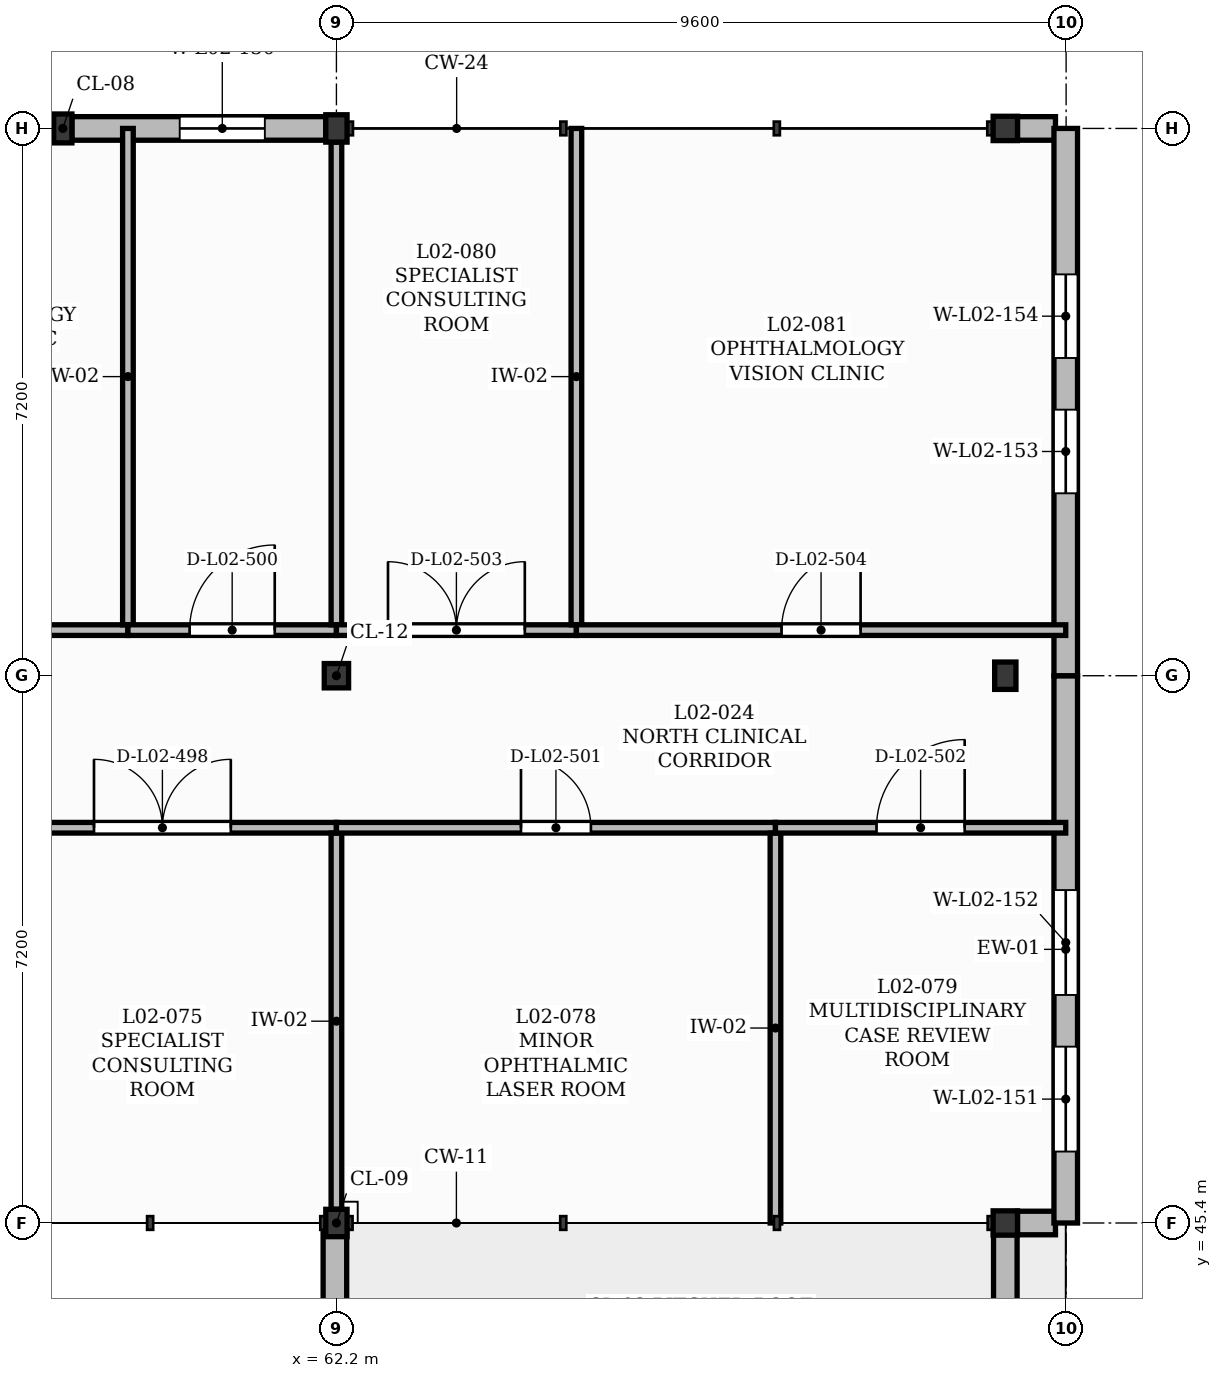
"""IFC4 building model, lengths in metres.
Left out: names, types, materials, properties, quantities, classifications, styles, units other than length and angle.
Written with IfcOpenShell. Run it as: python <this file> out.ifc"""

import sys

from ifc_helpers import new_model, si_unit, direction, frame, frame_2d, origin, origin_2d, place, context, subcontext, project, spatial, polyline, rectangle, outline, extrude, element, fill, save


model = new_model("IFC4")
c1 = context("Model", 3, precision=1e-05, world=origin(), true_north=direction((0.0, 1.0)))
c2 = subcontext(c1, "Body", "Model", "MODEL_VIEW")
j1 = project(units=[si_unit("LENGTHUNIT", "METRE"), si_unit("PLANEANGLEUNIT", "RADIAN")], contexts=[c1])
p1 = place(None, origin())
s1 = spatial("IfcSite", under=j1, at=p1, CompositionType="ELEMENT")
p2 = place(p1, origin())
s2 = spatial("IfcBuilding", under=s1, at=p2, CompositionType="ELEMENT")
p3 = place(p2, frame((0.0, 0.0, 9.0)))
s3 = spatial("IfcBuildingStorey", under=s2, at=p3, CompositionType="ELEMENT", Elevation=9.0)
p4 = place(p3, frame((62.2, 45.4, 0.0), z_axis=(0.0, 0.0, 1.0), x_axis=(1.0, 0.0, 0.0)))
e1 = element("IfcColumn", 1, at=p4, inside=s3, PredefinedType="COLUMN", context=c2, shape_type="SweptSolid", body=[
    extrude(rectangle(XDim=0.28, YDim=0.36, at=origin_2d()), origin(), (0.0, 0.0, 1.0), 3.98),
])
p5 = place(p3, frame((62.2, 52.6, 0.0), z_axis=(0.0, 0.0, 1.0), x_axis=(1.0, 0.0, 0.0)))
e2 = element("IfcColumn", 2, at=p5, inside=s3, PredefinedType="COLUMN", context=c2, shape_type="SweptSolid", body=[
    extrude(rectangle(XDim=0.32, YDim=0.32, at=origin_2d()), origin(), (0.0, 0.0, 1.0), 3.98),
])
p6 = place(p3, frame((62.2, 59.8, 0.0), z_axis=(0.0, 0.0, 1.0), x_axis=(1.0, 0.0, 0.0)))
e3 = element("IfcColumn", 3, at=p6, inside=s3, PredefinedType="COLUMN", context=c2, shape_type="SweptSolid", body=[
    extrude(rectangle(XDim=0.28, YDim=0.36, at=origin_2d()), origin(), (0.0, 0.0, 1.0), 3.98),
])
p7 = place(p3, frame((71.0, 45.4, 0.0), z_axis=(0.0, 0.0, 1.0), x_axis=(1.0, 0.0, 0.0)))
e4 = element("IfcColumn", 4, at=p7, inside=s3, PredefinedType="COLUMN", context=c2, shape_type="SweptSolid", body=[
    extrude(rectangle(XDim=0.32, YDim=0.32, at=origin_2d()), origin(), (0.0, 0.0, 1.0), 3.98),
])
p8 = place(p3, frame((71.0, 52.6, 0.0), z_axis=(0.0, 0.0, 1.0), x_axis=(1.0, 0.0, 0.0)))
e5 = element("IfcColumn", 5, at=p8, inside=s3, PredefinedType="COLUMN", context=c2, shape_type="SweptSolid", body=[
    extrude(rectangle(XDim=0.28, YDim=0.36, at=origin_2d()), origin(), (0.0, 0.0, 1.0), 3.98),
])
p9 = place(p3, frame((71.0, 59.8, 0.0), z_axis=(0.0, 0.0, 1.0), x_axis=(1.0, 0.0, 0.0)))
e6 = element("IfcColumn", 6, at=p9, inside=s3, PredefinedType="COLUMN", context=c2, shape_type="SweptSolid", body=[
    extrude(rectangle(XDim=0.32, YDim=0.32, at=origin_2d()), origin(), (0.0, 0.0, 1.0), 3.98),
])
p10 = place(p3, frame((58.6, 59.8, 0.0), z_axis=(0.0, 0.0, 1.0), x_axis=(1.0, 0.0, 0.0)))
e7 = element("IfcColumn", 7, at=p10, inside=s3, PredefinedType="PILASTER", context=c2, shape_type="SweptSolid", body=[
    extrude(rectangle(XDim=0.24, YDim=0.38, at=origin_2d()), origin(), (0.0, 0.0, 1.0), 3.99),
])
p11 = place(p3, frame((55.16, 59.8, 0.0), z_axis=(0.0, 0.0, 1.0), x_axis=(1.0, 0.0, 0.0)))
e8 = element("IfcWall", 8, at=p11, inside=s3, PredefinedType="SOLIDWALL", context=c2, shape_type="SweptSolid", body=[
    extrude(rectangle(XDim=3.32, YDim=0.31, at=frame_2d((1.66, 0.0))), origin(), (0.0, 0.0, 1.0), 3.52),
])
p12 = place(p11, frame((0.935, 0.0, 1.35)))
e9 = element("IfcOpeningElement", 9, at=p12, cuts=e8, PredefinedType="OPENING", context=c2, shape_type="SweptSolid", body=[
    extrude(rectangle(XDim=1.45, YDim=1.4, at=frame_2d((0.725, 0.7))), frame((0.0, 0.165, 0.0), z_axis=(0.0, -1.0, 0.0), x_axis=(1.0, 0.0, 0.0)), (0.0, 0.0, 1.0), 0.33),
])
p13 = place(p3, frame((58.72, 59.8, 0.0), z_axis=(0.0, 0.0, 1.0), x_axis=(1.0, 0.0, 0.0)))
e10 = element("IfcWall", 10, at=p13, inside=s3, PredefinedType="SOLIDWALL", context=c2, shape_type="SweptSolid", body=[
    extrude(rectangle(XDim=3.34, YDim=0.31, at=frame_2d((1.67, 0.0))), origin(), (0.0, 0.0, 1.0), 3.52),
])
p14 = place(p13, frame((1.418, 0.0, 1.05)))
e11 = element("IfcOpeningElement", 11, at=p14, cuts=e10, PredefinedType="OPENING", context=c2, shape_type="SweptSolid", body=[
    extrude(rectangle(XDim=1.12, YDim=1.65, at=frame_2d((0.56, 0.825))), frame((0.0, 0.165, 0.0), z_axis=(0.0, -1.0, 0.0), x_axis=(1.0, 0.0, 0.0)), (0.0, 0.0, 1.0), 0.33),
])
p15 = place(p3, frame((71.16, 45.4, 0.0), z_axis=(0.0, 0.0, 1.0), x_axis=(1.0, 0.0, 0.0)))
e12 = element("IfcWall", 12, at=p15, inside=s3, PredefinedType="SOLIDWALL", context=c2, shape_type="SweptSolid", body=[
    extrude(rectangle(XDim=0.5, YDim=0.31, at=frame_2d((0.25, 0.0))), origin(), (0.0, 0.0, 1.0), 3.98),
])
p16 = place(p3, frame((71.795, 45.4, 0.0), z_axis=(0.0, 0.0, 1.0), x_axis=(0.0, 1.0, 0.0)))
e13 = element("IfcWall", 13, at=p16, inside=s3, PredefinedType="SOLIDWALL", context=c2, shape_type="SweptSolid", body=[
    extrude(rectangle(XDim=7.2, YDim=0.31, at=frame_2d((3.6, 0.0))), origin(), (0.0, 0.0, 1.0), 3.98),
])
p17 = place(p16, frame((0.94, 0.0, 1.0)))
e14 = element("IfcOpeningElement", 14, at=p17, cuts=e13, PredefinedType="OPENING", context=c2, shape_type="SweptSolid", body=[
    extrude(rectangle(XDim=1.38, YDim=1.8, at=frame_2d((0.69, 0.9))), frame((0.0, 0.165, 0.0), z_axis=(0.0, -1.0, 0.0), x_axis=(1.0, 0.0, 0.0)), (0.0, 0.0, 1.0), 0.33),
])
p18 = place(p16, frame((3.0, 0.0, 1.0)))
e15 = element("IfcOpeningElement", 15, at=p18, cuts=e13, PredefinedType="OPENING", context=c2, shape_type="SweptSolid", body=[
    extrude(rectangle(XDim=1.38, YDim=1.8, at=frame_2d((0.69, 0.9))), frame((0.0, 0.165, 0.0), z_axis=(0.0, -1.0, 0.0), x_axis=(1.0, 0.0, 0.0)), (0.0, 0.0, 1.0), 0.33),
])
p19 = place(p3, frame((71.16, 59.8, 0.0), z_axis=(0.0, 0.0, 1.0), x_axis=(1.0, 0.0, 0.0)))
e16 = element("IfcWall", 16, at=p19, inside=s3, PredefinedType="SOLIDWALL", context=c2, shape_type="SweptSolid", body=[
    extrude(rectangle(XDim=0.5, YDim=0.31, at=frame_2d((0.25, 0.0))), origin(), (0.0, 0.0, 1.0), 3.98),
])
p20 = place(p3, frame((71.795, 52.6, 0.0), z_axis=(0.0, 0.0, 1.0), x_axis=(0.0, 1.0, 0.0)))
e17 = element("IfcWall", 17, at=p20, inside=s3, PredefinedType="SOLIDWALL", context=c2, shape_type="SweptSolid", body=[
    extrude(rectangle(XDim=7.2, YDim=0.31, at=frame_2d((3.6, 0.0))), origin(), (0.0, 0.0, 1.0), 3.98),
])
p21 = place(p20, frame((2.4, 0.0, 1.0)))
e18 = element("IfcOpeningElement", 18, at=p21, cuts=e17, PredefinedType="OPENING", context=c2, shape_type="SweptSolid", body=[
    extrude(rectangle(XDim=1.1, YDim=2.2, at=frame_2d((0.55, 1.1))), frame((0.0, 0.165, 0.0), z_axis=(0.0, -1.0, 0.0), x_axis=(1.0, 0.0, 0.0)), (0.0, 0.0, 1.0), 0.33),
])
p22 = place(p20, frame((4.18, 0.0, 1.0)))
e19 = element("IfcOpeningElement", 19, at=p22, cuts=e17, PredefinedType="OPENING", context=c2, shape_type="SweptSolid", body=[
    extrude(rectangle(XDim=1.1, YDim=2.2, at=frame_2d((0.55, 1.1))), frame((0.0, 0.165, 0.0), z_axis=(0.0, -1.0, 0.0), x_axis=(1.0, 0.0, 0.0)), (0.0, 0.0, 1.0), 0.33),
])
for number, where, z_axis, x_axis in (
    (20, (62.18, 36.8, 0.0), (0.0, 0.0, 1.0), (0.0, 1.0, 0.0)),
    (21, (71.0, 36.8, 0.0), (0.0, 0.0, 1.0), (0.0, 1.0, 0.0)),
):
    element("IfcWall", number, at=place(p3, frame(where, z_axis=z_axis, x_axis=x_axis)), inside=s3, PredefinedType="SOLIDWALL", context=c2, shape_type="SweptSolid", body=[
        extrude(outline(polyline([(0.0, 0.0), (8.6, 0.0), (8.6, 0.05), (4.3, 2.16), (0.0, 0.05), (0.0, 0.0)])), frame((0.0, 0.155, 0.0), z_axis=(0.0, -1.0, 0.0), x_axis=(1.0, 0.0, 0.0)), (0.0, 0.0, 1.0), 0.31),
    ])
p23 = place(p3, frame((55.0, 53.2, 0.0), z_axis=(0.0, 0.0, 1.0), x_axis=(1.0, 0.0, 0.0)))
e22 = element("IfcWall", 22, at=p23, inside=s3, PredefinedType="PARTITIONING", context=c2, shape_type="SweptSolid", body=[
    extrude(rectangle(XDim=4.457, YDim=0.14, at=frame_2d((2.229, 0.0))), origin(), (0.0, 0.0, 1.0), 3.96),
])
p24 = place(p23, frame((1.708, 0.0, 0.0)))
e23 = element("IfcOpeningElement", 23, at=p24, cuts=e22, PredefinedType="OPENING", context=c2, shape_type="SweptSolid", body=[
    extrude(rectangle(XDim=1.04, YDim=2.1, at=frame_2d((0.52, 1.05))), frame((0.0, 0.08, 0.0), z_axis=(0.0, -1.0, 0.0), x_axis=(1.0, 0.0, 0.0)), (0.0, 0.0, 1.0), 0.16),
])
p25 = place(p3, frame((57.621, 50.6, 0.0), z_axis=(0.0, 0.0, 1.0), x_axis=(1.0, 0.0, 0.0)))
e24 = element("IfcWall", 24, at=p25, inside=s3, PredefinedType="PARTITIONING", context=c2, shape_type="SweptSolid", body=[
    extrude(rectangle(XDim=4.579, YDim=0.14, at=frame_2d((2.29, 0.0))), origin(), (0.0, 0.0, 1.0), 3.96),
])
p26 = place(p25, frame((1.389, 0.0, 0.0)))
e25 = element("IfcOpeningElement", 25, at=p26, cuts=e24, PredefinedType="OPENING", context=c2, shape_type="SweptSolid", body=[
    extrude(rectangle(XDim=1.8, YDim=2.3, at=frame_2d((0.9, 1.15))), frame((0.0, 0.08, 0.0), z_axis=(0.0, -1.0, 0.0), x_axis=(1.0, 0.0, 0.0)), (0.0, 0.0, 1.0), 0.16),
])
p27 = place(p3, frame((59.457, 53.27, 0.0), z_axis=(0.0, 0.0, 1.0), x_axis=(0.0, 1.0, 0.0)))
e26 = element("IfcWall", 26, at=p27, inside=s3, PredefinedType="PARTITIONING", context=c2, shape_type="SweptSolid", body=[
    extrude(rectangle(XDim=6.53, YDim=0.14, at=frame_2d((3.265, 0.0))), origin(), (0.0, 0.0, 1.0), 3.96),
])
p28 = place(p3, frame((59.457, 53.2, 0.0), z_axis=(0.0, 0.0, 1.0), x_axis=(1.0, 0.0, 0.0)))
e27 = element("IfcWall", 27, at=p28, inside=s3, PredefinedType="PARTITIONING", context=c2, shape_type="SweptSolid", body=[
    extrude(rectangle(XDim=2.743, YDim=0.14, at=frame_2d((1.372, 0.0))), origin(), (0.0, 0.0, 1.0), 3.96),
])
p29 = place(p28, frame((0.812, 0.0, 0.0)))
e28 = element("IfcOpeningElement", 28, at=p29, cuts=e27, PredefinedType="OPENING", context=c2, shape_type="SweptSolid", body=[
    extrude(rectangle(XDim=1.12, YDim=2.15, at=frame_2d((0.56, 1.075))), frame((0.0, 0.08, 0.0), z_axis=(0.0, -1.0, 0.0), x_axis=(1.0, 0.0, 0.0)), (0.0, 0.0, 1.0), 0.16),
])
p30 = place(p3, frame((62.2, 45.58, 0.0), z_axis=(0.0, 0.0, 1.0), x_axis=(0.0, 1.0, 0.0)))
e29 = element("IfcWall", 29, at=p30, inside=s3, PredefinedType="PARTITIONING", context=c2, shape_type="SweptSolid", body=[
    extrude(rectangle(XDim=4.95, YDim=0.14, at=frame_2d((2.475, 0.0))), origin(), (0.0, 0.0, 1.0), 3.52),
])
p31 = place(p3, frame((62.2, 50.6, 0.0), z_axis=(0.0, 0.0, 1.0), x_axis=(1.0, 0.0, 0.0)))
e30 = element("IfcWall", 30, at=p31, inside=s3, PredefinedType="PARTITIONING", context=c2, shape_type="SweptSolid", body=[
    extrude(rectangle(XDim=5.776, YDim=0.14, at=frame_2d((2.888, 0.0))), origin(), (0.0, 0.0, 1.0), 3.96),
])
p32 = place(p31, frame((2.428, 0.0, 0.0)))
e31 = element("IfcOpeningElement", 31, at=p32, cuts=e30, PredefinedType="OPENING", context=c2, shape_type="SweptSolid", body=[
    extrude(rectangle(XDim=0.92, YDim=2.1, at=frame_2d((0.46, 1.05))), frame((0.0, 0.08, 0.0), z_axis=(0.0, -1.0, 0.0), x_axis=(1.0, 0.0, 0.0)), (0.0, 0.0, 1.0), 0.16),
])
p33 = place(p3, frame((62.2, 53.27, 0.0), z_axis=(0.0, 0.0, 1.0), x_axis=(0.0, 1.0, 0.0)))
e32 = element("IfcWall", 32, at=p33, inside=s3, PredefinedType="PARTITIONING", context=c2, shape_type="SweptSolid", body=[
    extrude(rectangle(XDim=6.35, YDim=0.14, at=frame_2d((3.175, 0.0))), origin(), (0.0, 0.0, 1.0), 3.52),
])
p34 = place(p3, frame((62.2, 53.2, 0.0), z_axis=(0.0, 0.0, 1.0), x_axis=(1.0, 0.0, 0.0)))
e33 = element("IfcWall", 33, at=p34, inside=s3, PredefinedType="PARTITIONING", context=c2, shape_type="SweptSolid", body=[
    extrude(rectangle(XDim=3.157, YDim=0.14, at=frame_2d((1.579, 0.0))), origin(), (0.0, 0.0, 1.0), 3.96),
])
p35 = place(p34, frame((0.678, 0.0, 0.0)))
e34 = element("IfcOpeningElement", 34, at=p35, cuts=e33, PredefinedType="OPENING", context=c2, shape_type="SweptSolid", body=[
    extrude(rectangle(XDim=1.8, YDim=2.3, at=frame_2d((0.9, 1.15))), frame((0.0, 0.08, 0.0), z_axis=(0.0, -1.0, 0.0), x_axis=(1.0, 0.0, 0.0)), (0.0, 0.0, 1.0), 0.16),
])
p36 = place(p3, frame((65.357, 53.27, 0.0), z_axis=(0.0, 0.0, 1.0), x_axis=(0.0, 1.0, 0.0)))
e35 = element("IfcWall", 35, at=p36, inside=s3, PredefinedType="PARTITIONING", context=c2, shape_type="SweptSolid", body=[
    extrude(rectangle(XDim=6.53, YDim=0.14, at=frame_2d((3.265, 0.0))), origin(), (0.0, 0.0, 1.0), 3.96),
])
p37 = place(p3, frame((65.357, 53.2, 0.0), z_axis=(0.0, 0.0, 1.0), x_axis=(1.0, 0.0, 0.0)))
e36 = element("IfcWall", 36, at=p37, inside=s3, PredefinedType="PARTITIONING", context=c2, shape_type="SweptSolid", body=[
    extrude(rectangle(XDim=6.438, YDim=0.14, at=frame_2d((3.219, 0.0))), origin(), (0.0, 0.0, 1.0), 3.96),
])
p38 = place(p37, frame((2.699, 0.0, 0.0)))
e37 = element("IfcOpeningElement", 37, at=p38, cuts=e36, PredefinedType="OPENING", context=c2, shape_type="SweptSolid", body=[
    extrude(rectangle(XDim=1.04, YDim=2.1, at=frame_2d((0.52, 1.05))), frame((0.0, 0.08, 0.0), z_axis=(0.0, -1.0, 0.0), x_axis=(1.0, 0.0, 0.0)), (0.0, 0.0, 1.0), 0.16),
])
p39 = place(p3, frame((67.976, 45.4, 0.0), z_axis=(0.0, 0.0, 1.0), x_axis=(0.0, 1.0, 0.0)))
e38 = element("IfcWall", 38, at=p39, inside=s3, PredefinedType="PARTITIONING", context=c2, shape_type="SweptSolid", body=[
    extrude(rectangle(XDim=5.13, YDim=0.14, at=frame_2d((2.565, 0.0))), origin(), (0.0, 0.0, 1.0), 3.96),
])
p40 = place(p3, frame((67.976, 50.6, 0.0), z_axis=(0.0, 0.0, 1.0), x_axis=(1.0, 0.0, 0.0)))
e39 = element("IfcWall", 39, at=p40, inside=s3, PredefinedType="PARTITIONING", context=c2, shape_type="SweptSolid", body=[
    extrude(rectangle(XDim=3.819, YDim=0.14, at=frame_2d((1.909, 0.0))), origin(), (0.0, 0.0, 1.0), 3.96),
])
p41 = place(p40, frame((1.33, 0.0, 0.0)))
e40 = element("IfcOpeningElement", 40, at=p41, cuts=e39, PredefinedType="OPENING", context=c2, shape_type="SweptSolid", body=[
    extrude(rectangle(XDim=1.16, YDim=2.1, at=frame_2d((0.58, 1.05))), frame((0.0, 0.08, 0.0), z_axis=(0.0, -1.0, 0.0), x_axis=(1.0, 0.0, 0.0)), (0.0, 0.0, 1.0), 0.16),
])
p42 = place(p14, origin())
e41 = element("IfcWindow", 41, at=p42, inside=s3, PartitioningType="SINGLE_PANEL", PredefinedType="WINDOW", context=c2, shape_type="SweptSolid", body=[
    extrude(rectangle(XDim=1.12, YDim=1.65, at=frame_2d((0.56, 0.825))), frame((0.0, 0.03, 0.0), z_axis=(0.0, -1.0, 0.0), x_axis=(1.0, 0.0, 0.0)), (0.0, 0.0, 1.0), 0.06),
])
fill(e11, e41)
p43 = place(p17, origin())
e42 = element("IfcWindow", 42, at=p43, inside=s3, PartitioningType="SINGLE_PANEL", PredefinedType="WINDOW", context=c2, shape_type="SweptSolid", body=[
    extrude(rectangle(XDim=1.38, YDim=1.8, at=frame_2d((0.69, 0.9))), frame((0.0, 0.03, 0.0), z_axis=(0.0, -1.0, 0.0), x_axis=(1.0, 0.0, 0.0)), (0.0, 0.0, 1.0), 0.06),
])
fill(e14, e42)
p44 = place(p18, origin())
e43 = element("IfcWindow", 43, at=p44, inside=s3, PartitioningType="SINGLE_PANEL", PredefinedType="WINDOW", context=c2, shape_type="SweptSolid", body=[
    extrude(rectangle(XDim=1.38, YDim=1.8, at=frame_2d((0.69, 0.9))), frame((0.0, 0.03, 0.0), z_axis=(0.0, -1.0, 0.0), x_axis=(1.0, 0.0, 0.0)), (0.0, 0.0, 1.0), 0.06),
])
fill(e15, e43)
p45 = place(p21, origin())
e44 = element("IfcWindow", 44, at=p45, inside=s3, PartitioningType="SINGLE_PANEL", PredefinedType="WINDOW", context=c2, shape_type="SweptSolid", body=[
    extrude(rectangle(XDim=1.1, YDim=2.2, at=frame_2d((0.55, 1.1))), frame((0.0, 0.03, 0.0), z_axis=(0.0, -1.0, 0.0), x_axis=(1.0, 0.0, 0.0)), (0.0, 0.0, 1.0), 0.06),
])
fill(e18, e44)
p46 = place(p22, origin())
e45 = element("IfcWindow", 45, at=p46, inside=s3, PartitioningType="SINGLE_PANEL", PredefinedType="WINDOW", context=c2, shape_type="SweptSolid", body=[
    extrude(rectangle(XDim=1.1, YDim=2.2, at=frame_2d((0.55, 1.1))), frame((0.0, 0.03, 0.0), z_axis=(0.0, -1.0, 0.0), x_axis=(1.0, 0.0, 0.0)), (0.0, 0.0, 1.0), 0.06),
])
fill(e19, e45)
p47 = place(p26, origin())
e46 = element("IfcDoor", 46, at=p47, inside=s3, OperationType="DOUBLE_DOOR_SINGLE_SWING", PredefinedType="DOOR", context=c2, shape_type="SweptSolid", body=[
    extrude(rectangle(XDim=1.8, YDim=2.3, at=frame_2d((0.9, 1.15))), frame((0.0, 0.025, 0.0), z_axis=(0.0, -1.0, 0.0), x_axis=(1.0, 0.0, 0.0)), (0.0, 0.0, 1.0), 0.05),
])
fill(e25, e46)
p48 = place(p29, origin())
e47 = element("IfcDoor", 47, at=p48, inside=s3, OperationType="SINGLE_SWING_RIGHT", PredefinedType="DOOR", context=c2, shape_type="SweptSolid", body=[
    extrude(rectangle(XDim=1.12, YDim=2.15, at=frame_2d((0.56, 1.075))), frame((0.0, 0.025, 0.0), z_axis=(0.0, -1.0, 0.0), x_axis=(1.0, 0.0, 0.0)), (0.0, 0.0, 1.0), 0.05),
])
fill(e28, e47)
p49 = place(p32, origin())
e48 = element("IfcDoor", 48, at=p49, inside=s3, OperationType="SINGLE_SWING_LEFT", PredefinedType="DOOR", context=c2, shape_type="SweptSolid", body=[
    extrude(rectangle(XDim=0.92, YDim=2.1, at=frame_2d((0.46, 1.05))), frame((0.0, 0.025, 0.0), z_axis=(0.0, -1.0, 0.0), x_axis=(1.0, 0.0, 0.0)), (0.0, 0.0, 1.0), 0.05),
])
fill(e31, e48)
p50 = place(p41, origin())
e49 = element("IfcDoor", 49, at=p50, inside=s3, OperationType="SINGLE_SWING_RIGHT", PredefinedType="DOOR", context=c2, shape_type="SweptSolid", body=[
    extrude(rectangle(XDim=1.16, YDim=2.1, at=frame_2d((0.58, 1.05))), frame((0.0, 0.025, 0.0), z_axis=(0.0, -1.0, 0.0), x_axis=(1.0, 0.0, 0.0)), (0.0, 0.0, 1.0), 0.05),
])
fill(e40, e49)
p51 = place(p35, origin())
e50 = element("IfcDoor", 50, at=p51, inside=s3, OperationType="DOUBLE_DOOR_SINGLE_SWING", PredefinedType="DOOR", context=c2, shape_type="SweptSolid", body=[
    extrude(rectangle(XDim=1.8, YDim=2.3, at=frame_2d((0.9, 1.15))), frame((0.0, 0.025, 0.0), z_axis=(0.0, -1.0, 0.0), x_axis=(1.0, 0.0, 0.0)), (0.0, 0.0, 1.0), 0.05),
])
fill(e34, e50)
p52 = place(p38, origin())
e51 = element("IfcDoor", 51, at=p52, inside=s3, OperationType="SINGLE_SWING_RIGHT", PredefinedType="DOOR", context=c2, shape_type="SweptSolid", body=[
    extrude(rectangle(XDim=1.04, YDim=2.1, at=frame_2d((0.52, 1.05))), frame((0.0, 0.025, 0.0), z_axis=(0.0, -1.0, 0.0), x_axis=(1.0, 0.0, 0.0)), (0.0, 0.0, 1.0), 0.05),
])
fill(e37, e51)
save(model, sys.argv[1])
